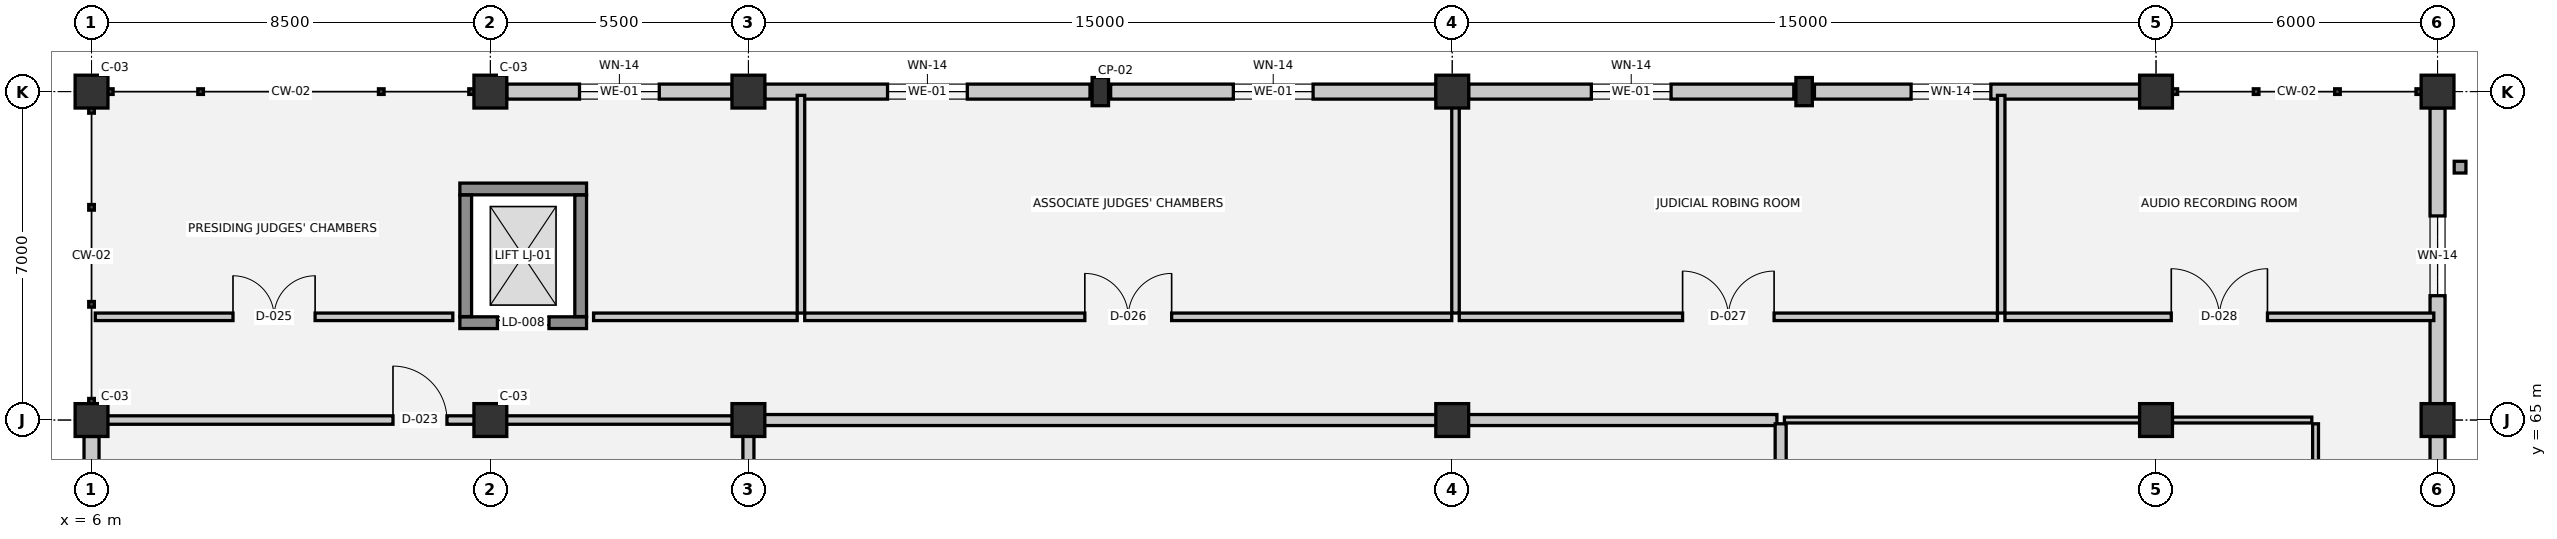
"""IFC4 building model, lengths in metres.
Left out: names, types, materials, properties, quantities, classifications, styles, units other than length and angle.
Written with IfcOpenShell. Run it as: python <this file> out.ifc"""

import sys

from ifc_helpers import new_model, si_unit, direction, frame, frame_2d, origin, origin_2d, place, context, subcontext, project, spatial, rectangle, extrude, element, fill, save


model = new_model("IFC4")
c1 = context("Model", 3, precision=1e-05, world=origin(), true_north=direction((0.0, 1.0)))
c2 = subcontext(c1, "Body", "Model", "MODEL_VIEW")
j1 = project(units=[si_unit("LENGTHUNIT", "METRE"), si_unit("PLANEANGLEUNIT", "RADIAN")], contexts=[c1])
p1 = place(None, origin())
s1 = spatial("IfcSite", under=j1, at=p1, CompositionType="ELEMENT")
p2 = place(p1, origin())
s2 = spatial("IfcBuilding", under=s1, at=p2, CompositionType="ELEMENT")
p3 = place(p2, frame((0.0, 0.0, 5.4)))
s3 = spatial("IfcBuildingStorey", under=s2, at=p3, CompositionType="ELEMENT", Elevation=5.4)
for number, where, z_axis, x_axis in (
    (1, (6.0, 65.0, 0.0), (0.0, 0.0, 1.0), (1.0, 0.0, 0.0)),
    (2, (6.0, 72.0, 0.0), (0.0, 0.0, 1.0), (1.0, 0.0, 0.0)),
    (3, (14.5, 65.0, 0.0), (0.0, 0.0, 1.0), (1.0, 0.0, 0.0)),
    (4, (14.5, 72.0, 0.0), (0.0, 0.0, 1.0), (1.0, 0.0, 0.0)),
    (5, (20.0, 65.0, 0.0), (0.0, 0.0, 1.0), (1.0, 0.0, 0.0)),
    (6, (20.0, 72.0, 0.0), (0.0, 0.0, 1.0), (1.0, 0.0, 0.0)),
    (7, (35.0, 65.0, 0.0), (0.0, 0.0, 1.0), (1.0, 0.0, 0.0)),
    (8, (35.0, 72.0, 0.0), (0.0, 0.0, 1.0), (1.0, 0.0, 0.0)),
    (9, (50.0, 65.0, 0.0), (0.0, 0.0, 1.0), (1.0, 0.0, 0.0)),
    (10, (50.0, 72.0, 0.0), (0.0, 0.0, 1.0), (1.0, 0.0, 0.0)),
    (11, (56.0, 65.0, 0.0), (0.0, 0.0, 1.0), (1.0, 0.0, 0.0)),
    (12, (56.0, 72.0, 0.0), (0.0, 0.0, 1.0), (1.0, 0.0, 0.0)),
):
    element("IfcColumn", number, at=place(p3, frame(where, z_axis=z_axis, x_axis=x_axis)), inside=s3, PredefinedType="COLUMN", context=c2, shape_type="SweptSolid", body=[
        extrude(rectangle(XDim=0.7, YDim=0.7, at=origin_2d()), origin(), (0.0, 0.0, 1.0), 4.5),
    ])
for number, where, z_axis, x_axis in (
    (13, (27.5, 72.0, 0.0), (0.0, 0.0, 1.0), (1.0, 0.0, 0.0)),
    (14, (42.5, 72.0, 0.0), (0.0, 0.0, 1.0), (1.0, 0.0, 0.0)),
):
    element("IfcColumn", number, at=place(p3, frame(where, z_axis=z_axis, x_axis=x_axis)), inside=s3, PredefinedType="PILASTER", context=c2, shape_type="SweptSolid", body=[
        extrude(rectangle(XDim=0.35, YDim=0.6, at=origin_2d()), origin(), (0.0, 0.0, 1.0), 4.5),
    ])
p4 = place(p3, frame((6.0, 51.35, 0.0), z_axis=(0.0, 0.0, 1.0), x_axis=(0.0, 1.0, 0.0)))
e15 = element("IfcWall", 15, at=p4, inside=s3, PredefinedType="SOLIDWALL", context=c2, shape_type="SweptSolid", body=[
    extrude(rectangle(XDim=13.3, YDim=0.32, at=frame_2d((6.65, 0.0))), origin(), (0.0, 0.0, 1.0), 3.11),
])
p5 = place(p4, frame((5.8, 0.0, 0.9)))
e16 = element("IfcOpeningElement", 16, at=p5, cuts=e15, PredefinedType="OPENING", context=c2, shape_type="SweptSolid", body=[
    extrude(rectangle(XDim=1.7, YDim=1.9, at=frame_2d((0.85, 0.95))), frame((0.0, 0.17, 0.0), z_axis=(0.0, -1.0, 0.0), x_axis=(1.0, 0.0, 0.0)), (0.0, 0.0, 1.0), 0.34),
])
p6 = place(p3, frame((14.85, 72.0, 0.0), z_axis=(0.0, 0.0, 1.0), x_axis=(1.0, 0.0, 0.0)))
e17 = element("IfcWall", 17, at=p6, inside=s3, PredefinedType="SOLIDWALL", context=c2, shape_type="SweptSolid", body=[
    extrude(rectangle(XDim=4.8, YDim=0.32, at=frame_2d((2.4, 0.0))), origin(), (0.0, 0.0, 1.0), 3.11),
])
p7 = place(p6, frame((1.55, 0.0, 0.9)))
e18 = element("IfcOpeningElement", 18, at=p7, cuts=e17, PredefinedType="OPENING", context=c2, shape_type="SweptSolid", body=[
    extrude(rectangle(XDim=1.7, YDim=1.9, at=frame_2d((0.85, 0.95))), frame((0.0, 0.17, 0.0), z_axis=(0.0, -1.0, 0.0), x_axis=(1.0, 0.0, 0.0)), (0.0, 0.0, 1.0), 0.34),
])
p8 = place(p3, frame((20.35, 72.0, 0.0), z_axis=(0.0, 0.0, 1.0), x_axis=(1.0, 0.0, 0.0)))
e19 = element("IfcWall", 19, at=p8, inside=s3, PredefinedType="SOLIDWALL", context=c2, shape_type="SweptSolid", body=[
    extrude(rectangle(XDim=6.93, YDim=0.32, at=frame_2d((3.465, 0.0))), origin(), (0.0, 0.0, 1.0), 3.11),
])
p9 = place(p8, frame((2.615, 0.0, 0.9)))
e20 = element("IfcOpeningElement", 20, at=p9, cuts=e19, PredefinedType="OPENING", context=c2, shape_type="SweptSolid", body=[
    extrude(rectangle(XDim=1.7, YDim=1.9, at=frame_2d((0.85, 0.95))), frame((0.0, 0.17, 0.0), z_axis=(0.0, -1.0, 0.0), x_axis=(1.0, 0.0, 0.0)), (0.0, 0.0, 1.0), 0.34),
])
p10 = place(p3, frame((27.72, 72.0, 0.0), z_axis=(0.0, 0.0, 1.0), x_axis=(1.0, 0.0, 0.0)))
e21 = element("IfcWall", 21, at=p10, inside=s3, PredefinedType="SOLIDWALL", context=c2, shape_type="SweptSolid", body=[
    extrude(rectangle(XDim=6.93, YDim=0.32, at=frame_2d((3.465, 0.0))), origin(), (0.0, 0.0, 1.0), 3.11),
])
p11 = place(p10, frame((2.615, 0.0, 0.9)))
e22 = element("IfcOpeningElement", 22, at=p11, cuts=e21, PredefinedType="OPENING", context=c2, shape_type="SweptSolid", body=[
    extrude(rectangle(XDim=1.7, YDim=1.9, at=frame_2d((0.85, 0.95))), frame((0.0, 0.17, 0.0), z_axis=(0.0, -1.0, 0.0), x_axis=(1.0, 0.0, 0.0)), (0.0, 0.0, 1.0), 0.34),
])
p12 = place(p3, frame((35.35, 72.0, 0.0), z_axis=(0.0, 0.0, 1.0), x_axis=(1.0, 0.0, 0.0)))
e23 = element("IfcWall", 23, at=p12, inside=s3, PredefinedType="SOLIDWALL", context=c2, shape_type="SweptSolid", body=[
    extrude(rectangle(XDim=6.93, YDim=0.32, at=frame_2d((3.465, 0.0))), origin(), (0.0, 0.0, 1.0), 3.11),
])
p13 = place(p12, frame((2.615, 0.0, 0.9)))
e24 = element("IfcOpeningElement", 24, at=p13, cuts=e23, PredefinedType="OPENING", context=c2, shape_type="SweptSolid", body=[
    extrude(rectangle(XDim=1.7, YDim=1.9, at=frame_2d((0.85, 0.95))), frame((0.0, 0.17, 0.0), z_axis=(0.0, -1.0, 0.0), x_axis=(1.0, 0.0, 0.0)), (0.0, 0.0, 1.0), 0.34),
])
p14 = place(p3, frame((42.72, 72.0, 0.0), z_axis=(0.0, 0.0, 1.0), x_axis=(1.0, 0.0, 0.0)))
e25 = element("IfcWall", 25, at=p14, inside=s3, PredefinedType="SOLIDWALL", context=c2, shape_type="SweptSolid", body=[
    extrude(rectangle(XDim=6.93, YDim=0.32, at=frame_2d((3.465, 0.0))), origin(), (0.0, 0.0, 1.0), 3.11),
])
p15 = place(p14, frame((2.06, 0.0, 0.9)))
e26 = element("IfcOpeningElement", 26, at=p15, cuts=e25, PredefinedType="OPENING", context=c2, shape_type="SweptSolid", body=[
    extrude(rectangle(XDim=1.7, YDim=1.9, at=frame_2d((0.85, 0.95))), frame((0.0, 0.17, 0.0), z_axis=(0.0, -1.0, 0.0), x_axis=(1.0, 0.0, 0.0)), (0.0, 0.0, 1.0), 0.34),
])
p16 = place(p3, frame((56.0, 71.65, 0.0), z_axis=(0.0, 0.0, 1.0), x_axis=(0.0, -1.0, 0.0)))
e27 = element("IfcWall", 27, at=p16, inside=s3, PredefinedType="SOLIDWALL", context=c2, shape_type="SweptSolid", body=[
    extrude(rectangle(XDim=6.3, YDim=0.32, at=frame_2d((3.15, 0.0))), origin(), (0.0, 0.0, 1.0), 3.11),
])
p17 = place(p16, frame((2.3, 0.0, 0.9)))
e28 = element("IfcOpeningElement", 28, at=p17, cuts=e27, PredefinedType="OPENING", context=c2, shape_type="SweptSolid", body=[
    extrude(rectangle(XDim=1.7, YDim=1.9, at=frame_2d((0.85, 0.95))), frame((0.0, 0.17, 0.0), z_axis=(0.0, -1.0, 0.0), x_axis=(1.0, 0.0, 0.0)), (0.0, 0.0, 1.0), 0.34),
])
p18 = place(p3, frame((56.0, 64.65, 0.0), z_axis=(0.0, 0.0, 1.0), x_axis=(0.0, -1.0, 0.0)))
e29 = element("IfcWall", 29, at=p18, inside=s3, PredefinedType="SOLIDWALL", context=c2, shape_type="SweptSolid", body=[
    extrude(rectangle(XDim=13.3, YDim=0.32, at=frame_2d((6.65, 0.0))), origin(), (0.0, 0.0, 1.0), 3.11),
])
p19 = place(p18, frame((9.925, 0.0, 0.0)))
e30 = element("IfcOpeningElement", 30, at=p19, cuts=e29, PredefinedType="OPENING", context=c2, shape_type="SweptSolid", body=[
    extrude(rectangle(XDim=1.65, YDim=2.2, at=frame_2d((0.825, 1.1))), frame((0.0, 0.17, 0.0), z_axis=(0.0, -1.0, 0.0), x_axis=(1.0, 0.0, 0.0)), (0.0, 0.0, 1.0), 0.34),
])
p20 = place(p3, frame((13.85, 67.075, 0.0), z_axis=(0.0, 0.0, 1.0), x_axis=(1.0, 0.0, 0.0)))
e31 = element("IfcWall", 31, at=p20, inside=s3, PredefinedType="SHEAR", context=c2, shape_type="SweptSolid", body=[
    extrude(rectangle(XDim=2.7, YDim=0.25, at=frame_2d((1.35, 0.0))), origin(), (0.0, 0.0, 1.0), 4.5),
])
p21 = place(p20, frame((0.8, 0.0, 0.0)))
e32 = element("IfcOpeningElement", 32, at=p21, cuts=e31, PredefinedType="OPENING", context=c2, shape_type="SweptSolid", body=[
    extrude(rectangle(XDim=1.1, YDim=2.15, at=frame_2d((0.55, 1.075))), frame((0.0, 0.135, 0.0), z_axis=(0.0, -1.0, 0.0), x_axis=(1.0, 0.0, 0.0)), (0.0, 0.0, 1.0), 0.27),
])
p22 = place(p3, frame((16.55, 69.925, 0.0), z_axis=(0.0, 0.0, 1.0), x_axis=(-1.0, 0.0, 0.0)))
e33 = element("IfcWall", 33, at=p22, inside=s3, PredefinedType="SHEAR", context=c2, shape_type="SweptSolid", body=[
    extrude(rectangle(XDim=2.7, YDim=0.25, at=frame_2d((1.35, 0.0))), origin(), (0.0, 0.0, 1.0), 4.5),
])
for number, where, z_axis, x_axis in (
    (34, (13.975, 69.795, 0.0), (0.0, 0.0, 1.0), (0.0, -1.0, 0.0)),
    (35, (16.425, 67.205, 0.0), (0.0, 0.0, 1.0), (0.0, 1.0, 0.0)),
):
    element("IfcWall", number, at=place(p3, frame(where, z_axis=z_axis, x_axis=x_axis)), inside=s3, PredefinedType="SHEAR", context=c2, shape_type="SweptSolid", body=[
        extrude(rectangle(XDim=2.59, YDim=0.25, at=frame_2d((1.295, 0.0))), origin(), (0.0, 0.0, 1.0), 4.5),
    ])
p23 = place(p3, frame((6.08, 65.0, 0.0), z_axis=(0.0, 0.0, 1.0), x_axis=(1.0, 0.0, 0.0)))
e36 = element("IfcWall", 36, at=p23, inside=s3, PredefinedType="PARTITIONING", context=c2, shape_type="SweptSolid", body=[
    extrude(rectangle(XDim=13.84, YDim=0.18, at=frame_2d((6.92, 0.0))), origin(), (0.0, 0.0, 1.0), 3.53),
])
p24 = place(p23, frame((6.345, 0.0, 0.0)))
e37 = element("IfcOpeningElement", 37, at=p24, cuts=e36, PredefinedType="OPENING", context=c2, shape_type="SweptSolid", body=[
    extrude(rectangle(XDim=1.15, YDim=2.2, at=frame_2d((0.575, 1.1))), frame((0.0, 0.1, 0.0), z_axis=(0.0, -1.0, 0.0), x_axis=(1.0, 0.0, 0.0)), (0.0, 0.0, 1.0), 0.2),
])
p25 = place(p3, frame((20.08, 65.0, 0.0), z_axis=(0.0, 0.0, 1.0), x_axis=(1.0, 0.0, 0.0)))
e38 = element("IfcWall", 38, at=p25, inside=s3, PredefinedType="PARTITIONING", context=c2, shape_type="SweptSolid", body=[
    extrude(rectangle(XDim=21.84, YDim=0.235, at=frame_2d((10.92, 0.0))), origin(), (0.0, 0.0, 1.0), 3.28),
])
p26 = place(p3, frame((42.08, 65.0, 0.0), z_axis=(0.0, 0.0, 1.0), x_axis=(1.0, 0.0, 0.0)))
e39 = element("IfcWall", 39, at=p26, inside=s3, PredefinedType="PARTITIONING", context=c2, shape_type="SweptSolid", body=[
    extrude(rectangle(XDim=8.27, YDim=0.125, at=frame_2d((4.135, 0.0))), origin(), (0.0, 0.0, 1.0), 3.28),
])
p27 = place(p3, frame((50.35, 65.0, 0.0), z_axis=(0.0, 0.0, 1.0), x_axis=(1.0, 0.0, 0.0)))
e40 = element("IfcWall", 40, at=p27, inside=s3, PredefinedType="PARTITIONING", context=c2, shape_type="SweptSolid", body=[
    extrude(rectangle(XDim=2.97, YDim=0.125, at=frame_2d((1.485, 0.0))), origin(), (0.0, 0.0, 1.0), 3.53),
])
p28 = place(p3, frame((6.08, 67.2, 0.0), z_axis=(0.0, 0.0, 1.0), x_axis=(1.0, 0.0, 0.0)))
e41 = element("IfcWall", 41, at=p28, inside=s3, PredefinedType="PARTITIONING", context=c2, shape_type="SweptSolid", body=[
    extrude(rectangle(XDim=7.62, YDim=0.16, at=frame_2d((3.81, 0.0))), origin(), (0.0, 0.0, 1.0), 4.14),
])
p29 = place(p28, frame((2.935, 0.0, 0.0)))
e42 = element("IfcOpeningElement", 42, at=p29, cuts=e41, PredefinedType="OPENING", context=c2, shape_type="SweptSolid", body=[
    extrude(rectangle(XDim=1.75, YDim=2.3, at=frame_2d((0.875, 1.15))), frame((0.0, 0.09, 0.0), z_axis=(0.0, -1.0, 0.0), x_axis=(1.0, 0.0, 0.0)), (0.0, 0.0, 1.0), 0.18),
])
p30 = place(p3, frame((16.7, 67.2, 0.0), z_axis=(0.0, 0.0, 1.0), x_axis=(1.0, 0.0, 0.0)))
e43 = element("IfcWall", 43, at=p30, inside=s3, PredefinedType="PARTITIONING", context=c2, shape_type="SweptSolid", body=[
    extrude(rectangle(XDim=4.34, YDim=0.16, at=frame_2d((2.17, 0.0))), origin(), (0.0, 0.0, 1.0), 4.14),
])
p31 = place(p3, frame((21.2, 67.2, 0.0), z_axis=(0.0, 0.0, 1.0), x_axis=(1.0, 0.0, 0.0)))
e44 = element("IfcWall", 44, at=p31, inside=s3, PredefinedType="PARTITIONING", context=c2, shape_type="SweptSolid", body=[
    extrude(rectangle(XDim=13.79, YDim=0.16, at=frame_2d((6.895, 0.0))), origin(), (0.0, 0.0, 1.0), 4.14),
])
p32 = place(p31, frame((5.97, 0.0, 0.0)))
e45 = element("IfcOpeningElement", 45, at=p32, cuts=e44, PredefinedType="OPENING", context=c2, shape_type="SweptSolid", body=[
    extrude(rectangle(XDim=1.85, YDim=2.3, at=frame_2d((0.925, 1.15))), frame((0.0, 0.09, 0.0), z_axis=(0.0, -1.0, 0.0), x_axis=(1.0, 0.0, 0.0)), (0.0, 0.0, 1.0), 0.18),
])
p33 = place(p3, frame((35.15, 67.2, 0.0), z_axis=(0.0, 0.0, 1.0), x_axis=(1.0, 0.0, 0.0)))
e46 = element("IfcWall", 46, at=p33, inside=s3, PredefinedType="PARTITIONING", context=c2, shape_type="SweptSolid", body=[
    extrude(rectangle(XDim=11.47, YDim=0.16, at=frame_2d((5.735, 0.0))), origin(), (0.0, 0.0, 1.0), 4.14),
])
p34 = place(p33, frame((4.76, 0.0, 0.0)))
e47 = element("IfcOpeningElement", 47, at=p34, cuts=e46, PredefinedType="OPENING", context=c2, shape_type="SweptSolid", body=[
    extrude(rectangle(XDim=1.95, YDim=2.35, at=frame_2d((0.975, 1.175))), frame((0.0, 0.09, 0.0), z_axis=(0.0, -1.0, 0.0), x_axis=(1.0, 0.0, 0.0)), (0.0, 0.0, 1.0), 0.18),
])
p35 = place(p3, frame((46.78, 67.2, 0.0), z_axis=(0.0, 0.0, 1.0), x_axis=(1.0, 0.0, 0.0)))
e48 = element("IfcWall", 48, at=p35, inside=s3, PredefinedType="PARTITIONING", context=c2, shape_type="SweptSolid", body=[
    extrude(rectangle(XDim=9.14, YDim=0.16, at=frame_2d((4.57, 0.0))), origin(), (0.0, 0.0, 1.0), 4.14),
])
p36 = place(p35, frame((3.545, 0.0, 0.0)))
e49 = element("IfcOpeningElement", 49, at=p36, cuts=e48, PredefinedType="OPENING", context=c2, shape_type="SweptSolid", body=[
    extrude(rectangle(XDim=2.05, YDim=2.35, at=frame_2d((1.025, 1.175))), frame((0.0, 0.09, 0.0), z_axis=(0.0, -1.0, 0.0), x_axis=(1.0, 0.0, 0.0)), (0.0, 0.0, 1.0), 0.18),
])
p37 = place(p3, frame((20.0, 51.08, 0.0), z_axis=(0.0, 0.0, 1.0), x_axis=(0.0, 1.0, 0.0)))
e50 = element("IfcWall", 50, at=p37, inside=s3, PredefinedType="PARTITIONING", context=c2, shape_type="SweptSolid", body=[
    extrude(rectangle(XDim=13.84, YDim=0.235, at=frame_2d((6.92, 0.0))), origin(), (0.0, 0.0, 1.0), 3.13),
])
p38 = place(p3, frame((21.12, 67.28, 0.0), z_axis=(0.0, 0.0, 1.0), x_axis=(0.0, 1.0, 0.0)))
e51 = element("IfcWall", 51, at=p38, inside=s3, PredefinedType="PARTITIONING", context=c2, shape_type="SweptSolid", body=[
    extrude(rectangle(XDim=4.64, YDim=0.16, at=frame_2d((2.32, 0.0))), origin(), (0.0, 0.0, 1.0), 4.14),
])
p39 = place(p3, frame((35.07, 67.28, 0.0), z_axis=(0.0, 0.0, 1.0), x_axis=(0.0, 1.0, 0.0)))
e52 = element("IfcWall", 52, at=p39, inside=s3, PredefinedType="PARTITIONING", context=c2, shape_type="SweptSolid", body=[
    extrude(rectangle(XDim=4.64, YDim=0.16, at=frame_2d((2.32, 0.0))), origin(), (0.0, 0.0, 1.0), 3.58),
])
p40 = place(p3, frame((42.0, 51.08, 0.0), z_axis=(0.0, 0.0, 1.0), x_axis=(0.0, 1.0, 0.0)))
e53 = element("IfcWall", 53, at=p40, inside=s3, PredefinedType="PARTITIONING", context=c2, shape_type="SweptSolid", body=[
    extrude(rectangle(XDim=13.84, YDim=0.235, at=frame_2d((6.92, 0.0))), origin(), (0.0, 0.0, 1.0), 4.14),
])
p41 = place(p3, frame((46.7, 67.28, 0.0), z_axis=(0.0, 0.0, 1.0), x_axis=(0.0, 1.0, 0.0)))
e54 = element("IfcWall", 54, at=p41, inside=s3, PredefinedType="PARTITIONING", context=c2, shape_type="SweptSolid", body=[
    extrude(rectangle(XDim=4.64, YDim=0.16, at=frame_2d((2.32, 0.0))), origin(), (0.0, 0.0, 1.0), 4.14),
])
p42 = place(p3, frame((53.4, 51.08, 0.0), z_axis=(0.0, 0.0, 1.0), x_axis=(0.0, 1.0, 0.0)))
e55 = element("IfcWall", 55, at=p42, inside=s3, PredefinedType="PARTITIONING", context=c2, shape_type="SweptSolid", body=[
    extrude(rectangle(XDim=13.84, YDim=0.125, at=frame_2d((6.92, 0.0))), origin(), (0.0, 0.0, 1.0), 4.14),
])
p43 = place(p42, frame((6.07, 0.0, 0.0)))
e56 = element("IfcOpeningElement", 56, at=p43, cuts=e55, PredefinedType="OPENING", context=c2, shape_type="SweptSolid", body=[
    extrude(rectangle(XDim=1.7, YDim=2.3, at=frame_2d((0.85, 1.15))), frame((0.0, 0.073, 0.0), z_axis=(0.0, -1.0, 0.0), x_axis=(1.0, 0.0, 0.0)), (0.0, 0.0, 1.0), 0.145),
])
p44 = place(p7, origin())
e57 = element("IfcWindow", 57, at=p44, inside=s3, PartitioningType="SINGLE_PANEL", PredefinedType="WINDOW", context=c2, shape_type="SweptSolid", body=[
    extrude(rectangle(XDim=1.7, YDim=1.9, at=frame_2d((0.85, 0.95))), frame((0.0, 0.03, 0.0), z_axis=(0.0, -1.0, 0.0), x_axis=(1.0, 0.0, 0.0)), (0.0, 0.0, 1.0), 0.06),
])
fill(e18, e57)
p45 = place(p9, origin())
e58 = element("IfcWindow", 58, at=p45, inside=s3, PartitioningType="SINGLE_PANEL", PredefinedType="WINDOW", context=c2, shape_type="SweptSolid", body=[
    extrude(rectangle(XDim=1.7, YDim=1.9, at=frame_2d((0.85, 0.95))), frame((0.0, 0.03, 0.0), z_axis=(0.0, -1.0, 0.0), x_axis=(1.0, 0.0, 0.0)), (0.0, 0.0, 1.0), 0.06),
])
fill(e20, e58)
p46 = place(p11, origin())
e59 = element("IfcWindow", 59, at=p46, inside=s3, PartitioningType="SINGLE_PANEL", PredefinedType="WINDOW", context=c2, shape_type="SweptSolid", body=[
    extrude(rectangle(XDim=1.7, YDim=1.9, at=frame_2d((0.85, 0.95))), frame((0.0, 0.03, 0.0), z_axis=(0.0, -1.0, 0.0), x_axis=(1.0, 0.0, 0.0)), (0.0, 0.0, 1.0), 0.06),
])
fill(e22, e59)
p47 = place(p13, origin())
e60 = element("IfcWindow", 60, at=p47, inside=s3, PartitioningType="SINGLE_PANEL", PredefinedType="WINDOW", context=c2, shape_type="SweptSolid", body=[
    extrude(rectangle(XDim=1.7, YDim=1.9, at=frame_2d((0.85, 0.95))), frame((0.0, 0.03, 0.0), z_axis=(0.0, -1.0, 0.0), x_axis=(1.0, 0.0, 0.0)), (0.0, 0.0, 1.0), 0.06),
])
fill(e24, e60)
p48 = place(p15, origin())
e61 = element("IfcWindow", 61, at=p48, inside=s3, PartitioningType="SINGLE_PANEL", PredefinedType="WINDOW", context=c2, shape_type="SweptSolid", body=[
    extrude(rectangle(XDim=1.7, YDim=1.9, at=frame_2d((0.85, 0.95))), frame((0.0, 0.03, 0.0), z_axis=(0.0, -1.0, 0.0), x_axis=(1.0, 0.0, 0.0)), (0.0, 0.0, 1.0), 0.06),
])
fill(e26, e61)
p49 = place(p17, origin())
e62 = element("IfcWindow", 62, at=p49, inside=s3, PartitioningType="SINGLE_PANEL", PredefinedType="WINDOW", context=c2, shape_type="SweptSolid", body=[
    extrude(rectangle(XDim=1.7, YDim=1.9, at=frame_2d((0.85, 0.95))), frame((0.0, 0.03, 0.0), z_axis=(0.0, -1.0, 0.0), x_axis=(1.0, 0.0, 0.0)), (0.0, 0.0, 1.0), 0.06),
])
fill(e28, e62)
p50 = place(p21, origin())
e63 = element("IfcDoor", 63, at=p50, inside=s3, OperationType="DOUBLE_DOOR_SLIDING", PredefinedType="DOOR", context=c2, shape_type="SweptSolid", body=[
    extrude(rectangle(XDim=1.1, YDim=2.15, at=frame_2d((0.55, 1.075))), frame((0.0, 0.025, 0.0), z_axis=(0.0, -1.0, 0.0), x_axis=(1.0, 0.0, 0.0)), (0.0, 0.0, 1.0), 0.05),
])
fill(e32, e63)
p51 = place(p24, origin())
e64 = element("IfcDoor", 64, at=p51, inside=s3, OperationType="SINGLE_SWING_LEFT", PredefinedType="DOOR", context=c2, shape_type="SweptSolid", body=[
    extrude(rectangle(XDim=1.15, YDim=2.2, at=frame_2d((0.575, 1.1))), frame((0.0, 0.025, 0.0), z_axis=(0.0, -1.0, 0.0), x_axis=(1.0, 0.0, 0.0)), (0.0, 0.0, 1.0), 0.05),
])
fill(e37, e64)
p52 = place(p29, origin())
e65 = element("IfcDoor", 65, at=p52, inside=s3, OperationType="DOUBLE_DOOR_SINGLE_SWING", PredefinedType="DOOR", context=c2, shape_type="SweptSolid", body=[
    extrude(rectangle(XDim=1.75, YDim=2.3, at=frame_2d((0.875, 1.15))), frame((0.0, 0.025, 0.0), z_axis=(0.0, -1.0, 0.0), x_axis=(1.0, 0.0, 0.0)), (0.0, 0.0, 1.0), 0.05),
])
fill(e42, e65)
p53 = place(p32, origin())
e66 = element("IfcDoor", 66, at=p53, inside=s3, OperationType="DOUBLE_DOOR_SINGLE_SWING", PredefinedType="DOOR", context=c2, shape_type="SweptSolid", body=[
    extrude(rectangle(XDim=1.85, YDim=2.3, at=frame_2d((0.925, 1.15))), frame((0.0, 0.025, 0.0), z_axis=(0.0, -1.0, 0.0), x_axis=(1.0, 0.0, 0.0)), (0.0, 0.0, 1.0), 0.05),
])
fill(e45, e66)
p54 = place(p34, origin())
e67 = element("IfcDoor", 67, at=p54, inside=s3, OperationType="DOUBLE_DOOR_SINGLE_SWING", PredefinedType="DOOR", context=c2, shape_type="SweptSolid", body=[
    extrude(rectangle(XDim=1.95, YDim=2.35, at=frame_2d((0.975, 1.175))), frame((0.0, 0.025, 0.0), z_axis=(0.0, -1.0, 0.0), x_axis=(1.0, 0.0, 0.0)), (0.0, 0.0, 1.0), 0.05),
])
fill(e47, e67)
p55 = place(p36, origin())
e68 = element("IfcDoor", 68, at=p55, inside=s3, OperationType="DOUBLE_DOOR_SINGLE_SWING", PredefinedType="DOOR", context=c2, shape_type="SweptSolid", body=[
    extrude(rectangle(XDim=2.05, YDim=2.35, at=frame_2d((1.025, 1.175))), frame((0.0, 0.025, 0.0), z_axis=(0.0, -1.0, 0.0), x_axis=(1.0, 0.0, 0.0)), (0.0, 0.0, 1.0), 0.05),
])
fill(e49, e68)
save(model, sys.argv[1])
